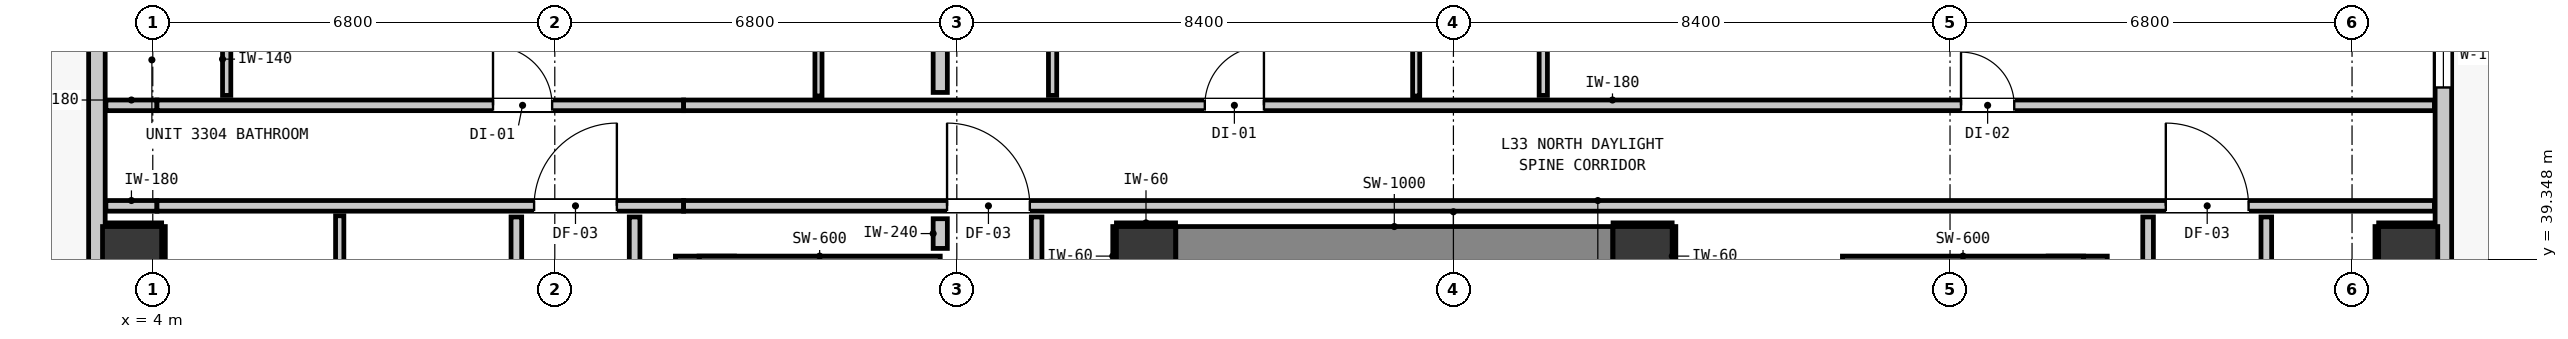
"""IFC4 building model, lengths in metres.
Left out: names, types, materials, properties, quantities, classifications, styles, units other than length and angle.
Written with IfcOpenShell. Run it as: python <this file> out.ifc"""

import sys

from ifc_helpers import new_model, si_unit, direction, frame, frame_2d, origin, origin_2d, place, context, subcontext, project, spatial, rectangle, extrude, element, fill, save


model = new_model("IFC4")
c1 = context("Model", 3, precision=1e-05, world=origin(), true_north=direction((0.0, 1.0)))
c2 = subcontext(c1, "Body", "Model", "MODEL_VIEW")
j1 = project(units=[si_unit("LENGTHUNIT", "METRE"), si_unit("PLANEANGLEUNIT", "RADIAN")], contexts=[c1])
p1 = place(None, origin())
s1 = spatial("IfcSite", under=j1, at=p1, CompositionType="ELEMENT")
p2 = place(p1, origin())
s2 = spatial("IfcBuilding", under=s1, at=p2, CompositionType="ELEMENT")
p3 = place(p2, frame((0.0, 0.0, 116.04)))
s3 = spatial("IfcBuildingStorey", under=s2, at=p3, CompositionType="ELEMENT", Elevation=116.04)
for number, where, z_axis, x_axis in (
    (1, (20.8, 39.4, 0.0), (0.0, 0.0, 1.0), (1.0, 0.0, 0.0)),
    (2, (29.2, 39.4, 0.0), (0.0, 0.0, 1.0), (1.0, 0.0, 0.0)),
):
    element("IfcColumn", number, at=place(p3, frame(where, z_axis=z_axis, x_axis=x_axis)), inside=s3, PredefinedType="COLUMN", context=c2, shape_type="SweptSolid", body=[
        extrude(rectangle(XDim=1.0, YDim=1.0, at=origin_2d()), origin(), (0.0, 0.0, 1.0), 3.32),
    ])
p4 = place(p3, frame((13.34, 31.205, 0.0), z_axis=(0.0, 0.0, 1.0), x_axis=(0.0, 1.0, 0.0)))
e3 = element("IfcWall", 3, at=p4, inside=s3, PredefinedType="SHEAR", context=c2, shape_type="SweptSolid", body=[
    extrude(rectangle(XDim=8.195, YDim=1.0, at=frame_2d((4.097, 0.0))), origin(), (0.0, 0.0, 1.0), 3.32),
])
p5 = place(p3, frame((13.24, 39.1, 0.0), z_axis=(0.0, 0.0, 1.0), x_axis=(1.0, 0.0, 0.0)))
e4 = element("IfcWall", 4, at=p5, inside=s3, PredefinedType="SHEAR", context=c2, shape_type="SweptSolid", body=[
    extrude(rectangle(XDim=4.08, YDim=0.6, at=frame_2d((2.04, 0.0))), origin(), (0.0, 0.0, 1.0), 3.32),
])
p6 = place(p3, frame((36.56, 31.205, 0.0), z_axis=(0.0, 0.0, 1.0), x_axis=(0.0, 1.0, 0.0)))
e5 = element("IfcWall", 5, at=p6, inside=s3, PredefinedType="SHEAR", context=c2, shape_type="SweptSolid", body=[
    extrude(rectangle(XDim=8.195, YDim=1.0, at=frame_2d((4.097, 0.0))), origin(), (0.0, 0.0, 1.0), 3.32),
])
p7 = place(p3, frame((32.58, 39.1, 0.0), z_axis=(0.0, 0.0, 1.0), x_axis=(1.0, 0.0, 0.0)))
e6 = element("IfcWall", 6, at=p7, inside=s3, PredefinedType="SHEAR", context=c2, shape_type="SweptSolid", body=[
    extrude(rectangle(XDim=4.08, YDim=0.6, at=frame_2d((2.04, 0.0))), origin(), (0.0, 0.0, 1.0), 3.32),
])
p8 = place(p3, frame((21.305, 39.4, 0.0), z_axis=(0.0, 0.0, 1.0), x_axis=(1.0, 0.0, 0.0)))
e7 = element("IfcWall", 7, at=p8, inside=s3, PredefinedType="SHEAR", context=c2, shape_type="SweptSolid", body=[
    extrude(rectangle(XDim=7.39, YDim=1.0, at=frame_2d((3.695, 0.0))), origin(), (0.0, 0.0, 1.0), 3.32),
])
for number, where, z_axis, x_axis in (
    (8, (3.65, 39.4, 0.0), (0.0, 0.0, 1.0), (1.0, 0.0, 0.0)),
    (9, (42.15, 39.4, 0.0), (0.0, 0.0, 1.0), (1.0, 0.0, 0.0)),
):
    element("IfcColumn", number, at=place(p3, frame(where, z_axis=z_axis, x_axis=x_axis)), inside=s3, PredefinedType="COLUMN", context=c2, shape_type="SweptSolid", body=[
        extrude(rectangle(XDim=1.0, YDim=1.0, at=origin_2d()), origin(), (0.0, 0.0, 1.0), 3.32),
    ])
p9 = place(p3, frame((3.055, 11.355, 0.0), z_axis=(0.0, 0.0, 1.0), x_axis=(0.0, 1.0, 0.0)))
e10 = element("IfcWall", 10, at=p9, inside=s3, PredefinedType="STANDARD", context=c2, shape_type="SweptSolid", body=[
    extrude(rectangle(XDim=32.29, YDim=0.28, at=frame_2d((16.145, 0.0))), origin(), (0.0, 0.0, 1.0), 3.08),
])
p10 = place(p9, frame((5.818, 0.0, 0.0)))
e11 = element("IfcOpeningElement", 11, at=p10, cuts=e10, PredefinedType="OPENING", context=c2, shape_type="SweptSolid", body=[
    extrude(rectangle(XDim=1.0, YDim=2.15, at=frame_2d((0.5, 1.075))), frame((0.0, 0.15, 0.0), z_axis=(0.0, -1.0, 0.0), x_axis=(1.0, 0.0, 0.0)), (0.0, 0.0, 1.0), 0.3),
])
p11 = place(p9, frame((0.52, 0.0, 0.85)))
e12 = element("IfcOpeningElement", 12, at=p11, cuts=e10, PredefinedType="OPENING", context=c2, shape_type="SweptSolid", body=[
    extrude(rectangle(XDim=1.1, YDim=2.05, at=frame_2d((0.55, 1.025))), frame((0.0, 0.15, 0.0), z_axis=(0.0, -1.0, 0.0), x_axis=(1.0, 0.0, 0.0)), (0.0, 0.0, 1.0), 0.3),
])
p12 = place(p9, frame((20.905, 0.0, 0.85)))
e13 = element("IfcOpeningElement", 13, at=p12, cuts=e10, PredefinedType="OPENING", context=c2, shape_type="SweptSolid", body=[
    extrude(rectangle(XDim=1.1, YDim=2.05, at=frame_2d((0.55, 1.025))), frame((0.0, 0.15, 0.0), z_axis=(0.0, -1.0, 0.0), x_axis=(1.0, 0.0, 0.0)), (0.0, 0.0, 1.0), 0.3),
])
p13 = place(p9, frame((12.735, 0.0, 0.85)))
e14 = element("IfcOpeningElement", 14, at=p13, cuts=e10, PredefinedType="OPENING", context=c2, shape_type="SweptSolid", body=[
    extrude(rectangle(XDim=1.1, YDim=2.05, at=frame_2d((0.55, 1.025))), frame((0.0, 0.15, 0.0), z_axis=(0.0, -1.0, 0.0), x_axis=(1.0, 0.0, 0.0)), (0.0, 0.0, 1.0), 0.3),
])
p14 = place(p9, frame((24.855, 0.0, 0.85)))
e15 = element("IfcOpeningElement", 15, at=p14, cuts=e10, PredefinedType="OPENING", context=c2, shape_type="SweptSolid", body=[
    extrude(rectangle(XDim=1.1, YDim=2.05, at=frame_2d((0.55, 1.025))), frame((0.0, 0.15, 0.0), z_axis=(0.0, -1.0, 0.0), x_axis=(1.0, 0.0, 0.0)), (0.0, 0.0, 1.0), 0.3),
])
p15 = place(p3, frame((42.745, 43.645, 0.0), z_axis=(0.0, 0.0, 1.0), x_axis=(0.0, -1.0, 0.0)))
e16 = element("IfcWall", 16, at=p15, inside=s3, PredefinedType="STANDARD", context=c2, shape_type="SweptSolid", body=[
    extrude(rectangle(XDim=32.29, YDim=0.28, at=frame_2d((16.145, 0.0))), origin(), (0.0, 0.0, 1.0), 3.08),
])
p16 = place(p15, frame((5.467, 0.0, 0.0)))
e17 = element("IfcOpeningElement", 17, at=p16, cuts=e16, PredefinedType="OPENING", context=c2, shape_type="SweptSolid", body=[
    extrude(rectangle(XDim=1.0, YDim=2.15, at=frame_2d((0.5, 1.075))), frame((0.0, 0.15, 0.0), z_axis=(0.0, -1.0, 0.0), x_axis=(1.0, 0.0, 0.0)), (0.0, 0.0, 1.0), 0.3),
])
p17 = place(p15, frame((0.293, 0.0, 0.85)))
e18 = element("IfcOpeningElement", 18, at=p17, cuts=e16, PredefinedType="OPENING", context=c2, shape_type="SweptSolid", body=[
    extrude(rectangle(XDim=1.1, YDim=2.05, at=frame_2d((0.55, 1.025))), frame((0.0, 0.15, 0.0), z_axis=(0.0, -1.0, 0.0), x_axis=(1.0, 0.0, 0.0)), (0.0, 0.0, 1.0), 0.3),
])
p18 = place(p15, frame((14.773, 0.0, 0.85)))
e19 = element("IfcOpeningElement", 19, at=p18, cuts=e16, PredefinedType="OPENING", context=c2, shape_type="SweptSolid", body=[
    extrude(rectangle(XDim=1.1, YDim=2.05, at=frame_2d((0.55, 1.025))), frame((0.0, 0.15, 0.0), z_axis=(0.0, -1.0, 0.0), x_axis=(1.0, 0.0, 0.0)), (0.0, 0.0, 1.0), 0.3),
])
p19 = place(p3, frame((3.207, 40.25, 0.0), z_axis=(0.0, 0.0, 1.0), x_axis=(1.0, 0.0, 0.0)))
e20 = element("IfcWall", 20, at=p19, inside=s3, PredefinedType="PARTITIONING", context=c2, shape_type="SweptSolid", body=[
    extrude(rectangle(XDim=0.864, YDim=0.18, at=frame_2d((0.432, 0.0))), origin(), (0.0, 0.0, 1.0), 3.08),
])
p20 = place(p3, frame((4.071, 40.25, 0.0), z_axis=(0.0, 0.0, 1.0), x_axis=(1.0, 0.0, 0.0)))
e21 = element("IfcWall", 21, at=p20, inside=s3, PredefinedType="PARTITIONING", context=c2, shape_type="SweptSolid", body=[
    extrude(rectangle(XDim=8.908, YDim=0.18, at=frame_2d((4.454, 0.0))), origin(), (0.0, 0.0, 1.0), 2.565),
])
p21 = place(p20, frame((6.379, 0.0, 0.0)))
e22 = element("IfcOpeningElement", 22, at=p21, cuts=e21, PredefinedType="OPENING", context=c2, shape_type="SweptSolid", body=[
    extrude(rectangle(XDim=1.4, YDim=2.15, at=frame_2d((0.7, 1.075))), frame((0.0, 0.1, 0.0), z_axis=(0.0, -1.0, 0.0), x_axis=(1.0, 0.0, 0.0)), (0.0, 0.0, 1.0), 0.2),
])
p22 = place(p3, frame((12.979, 40.25, 0.0), z_axis=(0.0, 0.0, 1.0), x_axis=(1.0, 0.0, 0.0)))
e23 = element("IfcWall", 23, at=p22, inside=s3, PredefinedType="PARTITIONING", context=c2, shape_type="SweptSolid", body=[
    extrude(rectangle(XDim=29.614, YDim=0.18, at=frame_2d((14.807, 0.0))), origin(), (0.0, 0.0, 1.0), 3.08),
])
p23 = place(p22, frame((4.456, 0.0, 0.0)))
e24 = element("IfcOpeningElement", 24, at=p23, cuts=e23, PredefinedType="OPENING", context=c2, shape_type="SweptSolid", body=[
    extrude(rectangle(XDim=1.4, YDim=2.15, at=frame_2d((0.7, 1.075))), frame((0.0, 0.1, 0.0), z_axis=(0.0, -1.0, 0.0), x_axis=(1.0, 0.0, 0.0)), (0.0, 0.0, 1.0), 0.2),
])
p24 = place(p22, frame((25.071, 0.0, 0.0)))
e25 = element("IfcOpeningElement", 25, at=p24, cuts=e23, PredefinedType="OPENING", context=c2, shape_type="SweptSolid", body=[
    extrude(rectangle(XDim=1.4, YDim=2.15, at=frame_2d((0.7, 1.075))), frame((0.0, 0.1, 0.0), z_axis=(0.0, -1.0, 0.0), x_axis=(1.0, 0.0, 0.0)), (0.0, 0.0, 1.0), 0.2),
])
p25 = place(p3, frame((3.207, 41.95, 0.0), z_axis=(0.0, 0.0, 1.0), x_axis=(1.0, 0.0, 0.0)))
e26 = element("IfcWall", 26, at=p25, inside=s3, PredefinedType="PARTITIONING", context=c2, shape_type="SweptSolid", body=[
    extrude(rectangle(XDim=0.864, YDim=0.18, at=frame_2d((0.432, 0.0))), origin(), (0.0, 0.0, 1.0), 3.08),
])
p26 = place(p3, frame((4.071, 41.95, 0.0), z_axis=(0.0, 0.0, 1.0), x_axis=(1.0, 0.0, 0.0)))
e27 = element("IfcWall", 27, at=p26, inside=s3, PredefinedType="PARTITIONING", context=c2, shape_type="SweptSolid", body=[
    extrude(rectangle(XDim=8.908, YDim=0.18, at=frame_2d((4.454, 0.0))), origin(), (0.0, 0.0, 1.0), 2.565),
])
p27 = place(p26, frame((5.684, 0.0, 0.0)))
e28 = element("IfcOpeningElement", 28, at=p27, cuts=e27, PredefinedType="OPENING", context=c2, shape_type="SweptSolid", body=[
    extrude(rectangle(XDim=1.0, YDim=2.15, at=frame_2d((0.5, 1.075))), frame((0.0, 0.1, 0.0), z_axis=(0.0, -1.0, 0.0), x_axis=(1.0, 0.0, 0.0)), (0.0, 0.0, 1.0), 0.2),
])
p28 = place(p3, frame((12.979, 41.95, 0.0), z_axis=(0.0, 0.0, 1.0), x_axis=(1.0, 0.0, 0.0)))
e29 = element("IfcWall", 29, at=p28, inside=s3, PredefinedType="PARTITIONING", context=c2, shape_type="SweptSolid", body=[
    extrude(rectangle(XDim=29.614, YDim=0.18, at=frame_2d((14.807, 0.0))), origin(), (0.0, 0.0, 1.0), 3.08),
])
p29 = place(p28, frame((8.816, 0.0, 0.0)))
e30 = element("IfcOpeningElement", 30, at=p29, cuts=e29, PredefinedType="OPENING", context=c2, shape_type="SweptSolid", body=[
    extrude(rectangle(XDim=1.0, YDim=2.15, at=frame_2d((0.5, 1.075))), frame((0.0, 0.1, 0.0), z_axis=(0.0, -1.0, 0.0), x_axis=(1.0, 0.0, 0.0)), (0.0, 0.0, 1.0), 0.2),
])
p30 = place(p28, frame((21.607, 0.0, 0.0)))
e31 = element("IfcOpeningElement", 31, at=p30, cuts=e29, PredefinedType="OPENING", context=c2, shape_type="SweptSolid", body=[
    extrude(rectangle(XDim=0.9, YDim=2.1, at=frame_2d((0.45, 1.05))), frame((0.0, 0.1, 0.0), z_axis=(0.0, -1.0, 0.0), x_axis=(1.0, 0.0, 0.0)), (0.0, 0.0, 1.0), 0.2),
])
p31 = place(p3, frame((17.32, 39.53, 0.0), z_axis=(0.0, 0.0, 1.0), x_axis=(0.0, 1.0, 0.0)))
e32 = element("IfcWall", 32, at=p31, inside=s3, PredefinedType="PARTITIONING", context=c2, shape_type="SweptSolid", body=[
    extrude(rectangle(XDim=0.502, YDim=0.24, at=frame_2d((0.251, 0.0))), origin(), (0.0, 0.0, 1.0), 3.08),
])
p32 = place(p3, frame((17.32, 42.168, 0.0), z_axis=(0.0, 0.0, 1.0), x_axis=(0.0, 1.0, 0.0)))
e33 = element("IfcWall", 33, at=p32, inside=s3, PredefinedType="PARTITIONING", context=c2, shape_type="SweptSolid", body=[
    extrude(rectangle(XDim=3.625, YDim=0.24, at=frame_2d((1.812, 0.0))), origin(), (0.0, 0.0, 1.0), 3.08),
])
p33 = place(p3, frame((10.15, 34.688, 0.0), z_axis=(0.0, 0.0, 1.0), x_axis=(0.0, 1.0, 0.0)))
e34 = element("IfcWall", 34, at=p33, inside=s3, PredefinedType="PARTITIONING", context=c2, shape_type="SweptSolid", body=[
    extrude(rectangle(XDim=5.374, YDim=0.18, at=frame_2d((2.687, 0.0))), origin(), (0.0, 0.0, 1.0), 3.08),
])
p34 = place(p3, frame((12.15, 21.368, 0.0), z_axis=(0.0, 0.0, 1.0), x_axis=(0.0, 1.0, 0.0)))
e35 = element("IfcWall", 35, at=p34, inside=s3, PredefinedType="PARTITIONING", context=c2, shape_type="SweptSolid", body=[
    extrude(rectangle(XDim=18.694, YDim=0.18, at=frame_2d((9.347, 0.0))), origin(), (0.0, 0.0, 1.0), 3.08),
])
p35 = place(p3, frame((18.95, 39.058, 0.0), z_axis=(0.0, 0.0, 1.0), x_axis=(0.0, 1.0, 0.0)))
e36 = element("IfcWall", 36, at=p35, inside=s3, PredefinedType="PARTITIONING", context=c2, shape_type="SweptSolid", body=[
    extrude(rectangle(XDim=1.004, YDim=0.18, at=frame_2d((0.502, 0.0))), origin(), (0.0, 0.0, 1.0), 3.08),
])
p36 = place(p3, frame((37.75, 21.368, 0.0), z_axis=(0.0, 0.0, 1.0), x_axis=(0.0, 1.0, 0.0)))
e37 = element("IfcWall", 37, at=p36, inside=s3, PredefinedType="PARTITIONING", context=c2, shape_type="SweptSolid", body=[
    extrude(rectangle(XDim=18.694, YDim=0.18, at=frame_2d((9.347, 0.0))), origin(), (0.0, 0.0, 1.0), 3.08),
])
p37 = place(p3, frame((39.75, 35.05, 0.0), z_axis=(0.0, 0.0, 1.0), x_axis=(0.0, 1.0, 0.0)))
e38 = element("IfcWall", 38, at=p37, inside=s3, PredefinedType="PARTITIONING", context=c2, shape_type="SweptSolid", body=[
    extrude(rectangle(XDim=5.012, YDim=0.18, at=frame_2d((2.506, 0.0))), origin(), (0.0, 0.0, 1.0), 3.08),
])
p38 = place(p3, frame((5.25, 42.118, 0.0), z_axis=(0.0, 0.0, 1.0), x_axis=(0.0, 1.0, 0.0)))
e39 = element("IfcWall", 39, at=p38, inside=s3, PredefinedType="PARTITIONING", context=c2, shape_type="SweptSolid", body=[
    extrude(rectangle(XDim=3.507, YDim=0.14, at=frame_2d((1.753, 0.0))), origin(), (0.0, 0.0, 1.0), 3.08),
])
p39 = place(p38, frame((1.327, 0.0, 0.0)))
e40 = element("IfcOpeningElement", 40, at=p39, cuts=e39, PredefinedType="OPENING", context=c2, shape_type="SweptSolid", body=[
    extrude(rectangle(XDim=0.86, YDim=2.02, at=frame_2d((0.43, 1.01))), frame((0.0, 0.08, 0.0), z_axis=(0.0, -1.0, 0.0), x_axis=(1.0, 0.0, 0.0)), (0.0, 0.0, 1.0), 0.16),
])
p40 = place(p3, frame((7.162, 34.668, 0.0), z_axis=(0.0, 0.0, 1.0), x_axis=(0.0, 1.0, 0.0)))
e41 = element("IfcWall", 41, at=p40, inside=s3, PredefinedType="PARTITIONING", context=c2, shape_type="SweptSolid", body=[
    extrude(rectangle(XDim=5.414, YDim=0.14, at=frame_2d((2.707, 0.0))), origin(), (0.0, 0.0, 1.0), 3.08),
])
p41 = place(p3, frame((19.22, 42.118, 0.0), z_axis=(0.0, 0.0, 1.0), x_axis=(0.0, 1.0, 0.0)))
e42 = element("IfcWall", 42, at=p41, inside=s3, PredefinedType="PARTITIONING", context=c2, shape_type="SweptSolid", body=[
    extrude(rectangle(XDim=3.675, YDim=0.14, at=frame_2d((1.837, 0.0))), origin(), (0.0, 0.0, 1.0), 3.08),
])
p42 = place(p41, frame((1.327, 0.0, 0.0)))
e43 = element("IfcOpeningElement", 43, at=p42, cuts=e42, PredefinedType="OPENING", context=c2, shape_type="SweptSolid", body=[
    extrude(rectangle(XDim=0.86, YDim=2.02, at=frame_2d((0.43, 1.01))), frame((0.0, 0.08, 0.0), z_axis=(0.0, -1.0, 0.0), x_axis=(1.0, 0.0, 0.0)), (0.0, 0.0, 1.0), 0.16),
])
p43 = place(p3, frame((27.52, 42.118, 0.0), z_axis=(0.0, 0.0, 1.0), x_axis=(0.0, 1.0, 0.0)))
e44 = element("IfcWall", 44, at=p43, inside=s3, PredefinedType="PARTITIONING", context=c2, shape_type="SweptSolid", body=[
    extrude(rectangle(XDim=3.675, YDim=0.14, at=frame_2d((1.837, 0.0))), origin(), (0.0, 0.0, 1.0), 3.08),
])
p44 = place(p3, frame((15.26, 42.108, 0.0), z_axis=(0.0, 0.0, 1.0), x_axis=(0.0, 1.0, 0.0)))
e45 = element("IfcWall", 45, at=p44, inside=s3, PredefinedType="PARTITIONING", context=c2, shape_type="SweptSolid", body=[
    extrude(rectangle(XDim=3.685, YDim=0.12, at=frame_2d((1.843, 0.0))), origin(), (0.0, 0.0, 1.0), 3.08),
])
p45 = place(p44, frame((1.317, 0.0, 0.0)))
e46 = element("IfcOpeningElement", 46, at=p45, cuts=e45, PredefinedType="OPENING", context=c2, shape_type="SweptSolid", body=[
    extrude(rectangle(XDim=0.9, YDim=2.1, at=frame_2d((0.45, 1.05))), frame((0.0, 0.07, 0.0), z_axis=(0.0, -1.0, 0.0), x_axis=(1.0, 0.0, 0.0)), (0.0, 0.0, 1.0), 0.14),
])
p46 = place(p3, frame((25.37, 42.108, 0.0), z_axis=(0.0, 0.0, 1.0), x_axis=(0.0, 1.0, 0.0)))
e47 = element("IfcWall", 47, at=p46, inside=s3, PredefinedType="PARTITIONING", context=c2, shape_type="SweptSolid", body=[
    extrude(rectangle(XDim=3.685, YDim=0.12, at=frame_2d((1.843, 0.0))), origin(), (0.0, 0.0, 1.0), 3.08),
])
p47 = place(p46, frame((1.317, 0.0, 0.0)))
e48 = element("IfcOpeningElement", 48, at=p47, cuts=e47, PredefinedType="OPENING", context=c2, shape_type="SweptSolid", body=[
    extrude(rectangle(XDim=0.9, YDim=2.1, at=frame_2d((0.45, 1.05))), frame((0.0, 0.07, 0.0), z_axis=(0.0, -1.0, 0.0), x_axis=(1.0, 0.0, 0.0)), (0.0, 0.0, 1.0), 0.14),
])
for number, where, z_axis, x_axis in (
    (49, (20.3, 39.932, 0.0), (0.0, 0.0, 1.0), (1.0, 0.0, 0.0)),
    (50, (20.268, 38.9, 0.0), (0.0, 0.0, 1.0), (0.0, 1.0, 0.0)),
    (51, (28.7, 39.932, 0.0), (0.0, 0.0, 1.0), (1.0, 0.0, 0.0)),
    (52, (29.732, 38.9, 0.0), (0.0, 0.0, 1.0), (0.0, 1.0, 0.0)),
):
    element("IfcWall", number, at=place(p3, frame(where, z_axis=z_axis, x_axis=x_axis)), inside=s3, PredefinedType="PARTITIONING", context=c2, shape_type="SweptSolid", body=[
        extrude(rectangle(XDim=1.0, YDim=0.06, at=frame_2d((0.5, 0.0))), origin(), (0.0, 0.0, 1.0), 1.45),
    ])
p48 = place(p3, frame((3.21, 39.932, 0.0), z_axis=(0.0, 0.0, 1.0), x_axis=(1.0, 0.0, 0.0)))
e53 = element("IfcWall", 53, at=p48, inside=s3, PredefinedType="PARTITIONING", context=c2, shape_type="SweptSolid", body=[
    extrude(rectangle(XDim=0.94, YDim=0.06, at=frame_2d((0.47, 0.0))), origin(), (0.0, 0.0, 1.0), 1.45),
])
p49 = place(p3, frame((4.182, 38.9, 0.0), z_axis=(0.0, 0.0, 1.0), x_axis=(0.0, 1.0, 0.0)))
e54 = element("IfcWall", 54, at=p49, inside=s3, PredefinedType="PARTITIONING", context=c2, shape_type="SweptSolid", body=[
    extrude(rectangle(XDim=1.0, YDim=0.06, at=frame_2d((0.5, 0.0))), origin(), (0.0, 0.0, 1.0), 1.45),
])
p50 = place(p3, frame((41.65, 39.932, 0.0), z_axis=(0.0, 0.0, 1.0), x_axis=(1.0, 0.0, 0.0)))
e55 = element("IfcWall", 55, at=p50, inside=s3, PredefinedType="PARTITIONING", context=c2, shape_type="SweptSolid", body=[
    extrude(rectangle(XDim=0.94, YDim=0.06, at=frame_2d((0.47, 0.0))), origin(), (0.0, 0.0, 1.0), 1.45),
])
p51 = place(p3, frame((41.618, 38.9, 0.0), z_axis=(0.0, 0.0, 1.0), x_axis=(0.0, 1.0, 0.0)))
e56 = element("IfcWall", 56, at=p51, inside=s3, PredefinedType="PARTITIONING", context=c2, shape_type="SweptSolid", body=[
    extrude(rectangle(XDim=1.0, YDim=0.06, at=frame_2d((0.5, 0.0))), origin(), (0.0, 0.0, 1.0), 1.45),
])
p52 = place(p17, origin())
e57 = element("IfcWindow", 57, at=p52, inside=s3, PartitioningType="SINGLE_PANEL", PredefinedType="WINDOW", context=c2, shape_type="SweptSolid", body=[
    extrude(rectangle(XDim=1.1, YDim=2.05, at=frame_2d((0.55, 1.025))), frame((0.0, 0.03, 0.0), z_axis=(0.0, -1.0, 0.0), x_axis=(1.0, 0.0, 0.0)), (0.0, 0.0, 1.0), 0.06),
])
fill(e18, e57)
p53 = place(p23, origin())
e58 = element("IfcDoor", 58, at=p53, inside=s3, OperationType="SINGLE_SWING_LEFT", PredefinedType="DOOR", context=c2, shape_type="SweptSolid", body=[
    extrude(rectangle(XDim=1.4, YDim=2.15, at=frame_2d((0.7, 1.075))), frame((0.0, 0.025, 0.0), z_axis=(0.0, -1.0, 0.0), x_axis=(1.0, 0.0, 0.0)), (0.0, 0.0, 1.0), 0.05),
])
fill(e24, e58)
p54 = place(p21, origin())
e59 = element("IfcDoor", 59, at=p54, inside=s3, OperationType="SINGLE_SWING_RIGHT", PredefinedType="DOOR", context=c2, shape_type="SweptSolid", body=[
    extrude(rectangle(XDim=1.4, YDim=2.15, at=frame_2d((0.7, 1.075))), frame((0.0, 0.025, 0.0), z_axis=(0.0, -1.0, 0.0), x_axis=(1.0, 0.0, 0.0)), (0.0, 0.0, 1.0), 0.05),
])
fill(e22, e59)
p55 = place(p24, origin())
e60 = element("IfcDoor", 60, at=p55, inside=s3, OperationType="SINGLE_SWING_LEFT", PredefinedType="DOOR", context=c2, shape_type="SweptSolid", body=[
    extrude(rectangle(XDim=1.4, YDim=2.15, at=frame_2d((0.7, 1.075))), frame((0.0, 0.025, 0.0), z_axis=(0.0, -1.0, 0.0), x_axis=(1.0, 0.0, 0.0)), (0.0, 0.0, 1.0), 0.05),
])
fill(e25, e60)
p56 = place(p27, origin())
e61 = element("IfcDoor", 61, at=p56, inside=s3, OperationType="SINGLE_SWING_LEFT", PredefinedType="DOOR", context=c2, shape_type="SweptSolid", body=[
    extrude(rectangle(XDim=1.0, YDim=2.15, at=frame_2d((0.5, 1.075))), frame((0.0, 0.025, 0.0), z_axis=(0.0, -1.0, 0.0), x_axis=(1.0, 0.0, 0.0)), (0.0, 0.0, 1.0), 0.05),
])
fill(e28, e61)
p57 = place(p29, origin())
e62 = element("IfcDoor", 62, at=p57, inside=s3, OperationType="SINGLE_SWING_RIGHT", PredefinedType="DOOR", context=c2, shape_type="SweptSolid", body=[
    extrude(rectangle(XDim=1.0, YDim=2.15, at=frame_2d((0.5, 1.075))), frame((0.0, 0.025, 0.0), z_axis=(0.0, -1.0, 0.0), x_axis=(1.0, 0.0, 0.0)), (0.0, 0.0, 1.0), 0.05),
])
fill(e30, e62)
p58 = place(p30, origin())
e63 = element("IfcDoor", 63, at=p58, inside=s3, OperationType="SINGLE_SWING_LEFT", PredefinedType="DOOR", context=c2, shape_type="SweptSolid", body=[
    extrude(rectangle(XDim=0.9, YDim=2.1, at=frame_2d((0.45, 1.05))), frame((0.0, 0.025, 0.0), z_axis=(0.0, -1.0, 0.0), x_axis=(1.0, 0.0, 0.0)), (0.0, 0.0, 1.0), 0.05),
])
fill(e31, e63)
save(model, sys.argv[1])
